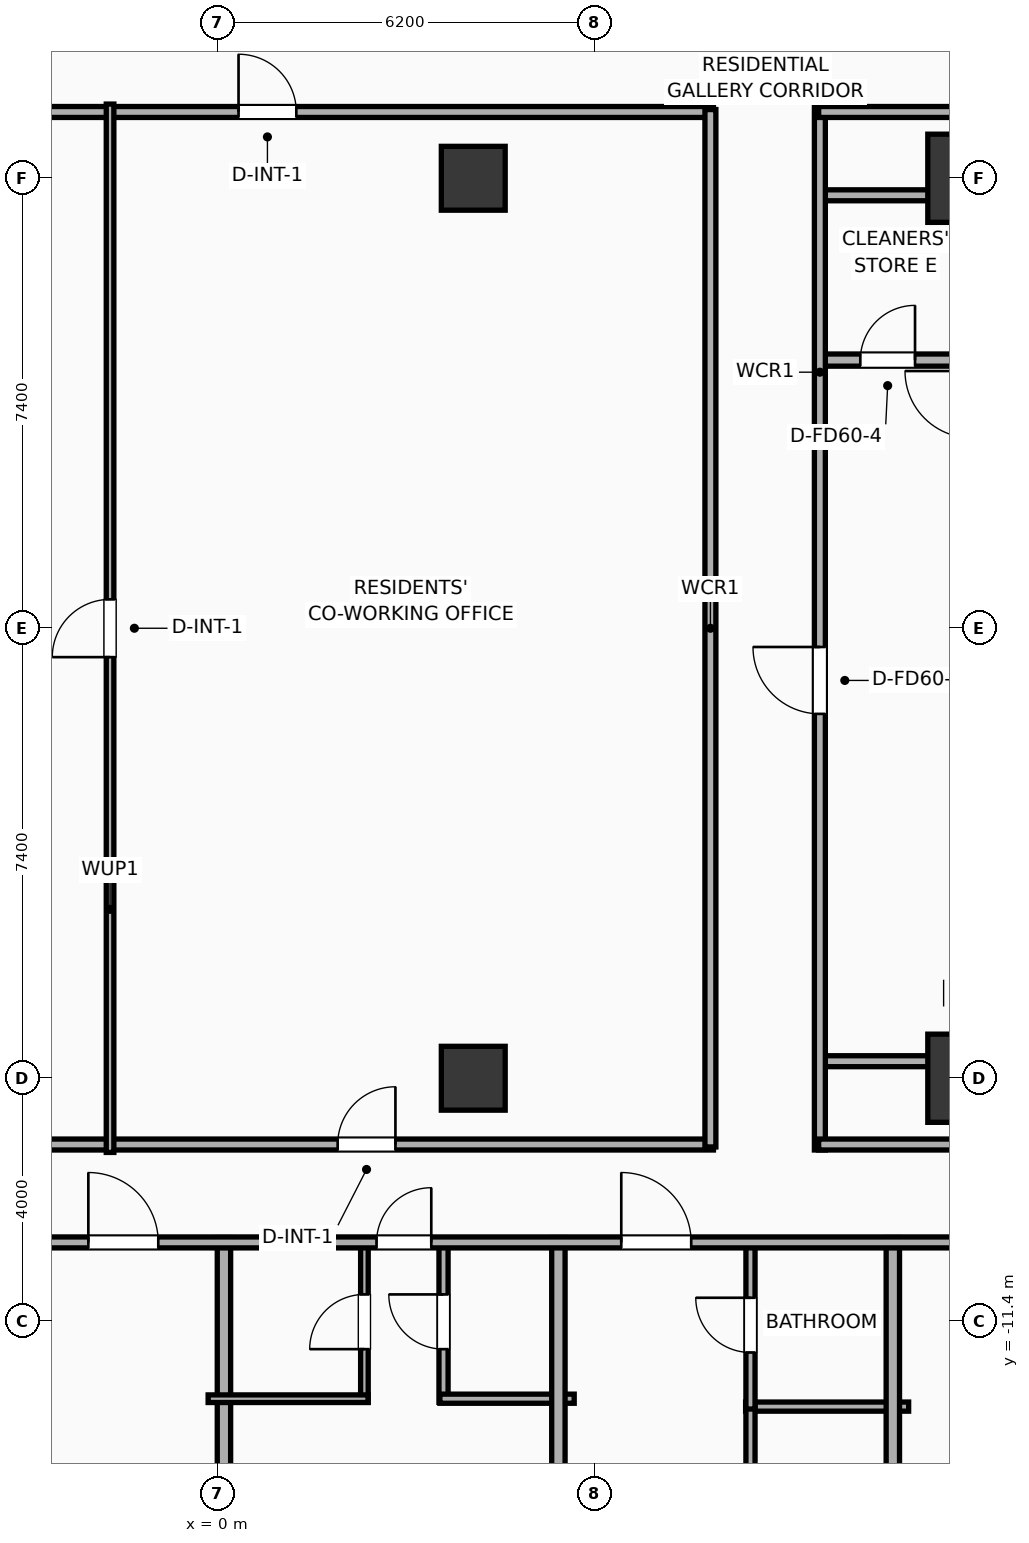
"""IFC4 building model, lengths in metres.
Left out: names, types, materials, properties, quantities, classifications, styles, units other than length and angle.
Written with IfcOpenShell. Run it as: python <this file> out.ifc"""

import sys

from ifc_helpers import new_model, si_unit, direction, frame, frame_2d, origin, origin_2d, place, context, subcontext, project, spatial, rectangle, extrude, element, fill, save


model = new_model("IFC4")
c1 = context("Model", 3, precision=1e-05, world=origin(), true_north=direction((0.0, 1.0)))
c2 = subcontext(c1, "Body", "Model", "MODEL_VIEW")
j1 = project(units=[si_unit("LENGTHUNIT", "METRE"), si_unit("PLANEANGLEUNIT", "RADIAN")], contexts=[c1])
p1 = place(None, origin())
s1 = spatial("IfcSite", under=j1, at=p1, CompositionType="ELEMENT")
p2 = place(p1, origin())
s2 = spatial("IfcBuilding", under=s1, at=p2, CompositionType="ELEMENT")
p3 = place(p2, frame((0.0, 0.0, 37.7)))
s3 = spatial("IfcBuildingStorey", under=s2, at=p3, CompositionType="ELEMENT", Elevation=37.7)
for number, where, z_axis, x_axis in (
    (1, (12.4, -7.4, 0.0), (0.0, 0.0, 1.0), (1.0, 0.0, 0.0)),
    (2, (12.4, 7.4, 0.0), (0.0, 0.0, 1.0), (1.0, 0.0, 0.0)),
):
    element("IfcColumn", number, at=place(p3, frame(where, z_axis=z_axis, x_axis=x_axis)), inside=s3, PredefinedType="COLUMN", context=c2, shape_type="SweptSolid", body=[
        extrude(rectangle(XDim=1.45, YDim=1.45, at=origin_2d()), origin(), (0.0, 0.0, 1.0), 3.9),
    ])
for number, where, z_axis, x_axis in (
    (3, (4.2, -7.4, 0.0), (0.0, 0.0, 1.0), (1.0, 0.0, 0.0)),
    (4, (4.2, 7.4, 0.0), (0.0, 0.0, 1.0), (1.0, 0.0, 0.0)),
):
    element("IfcColumn", number, at=place(p3, frame(where, z_axis=z_axis, x_axis=x_axis)), inside=s3, PredefinedType="COLUMN", context=c2, shape_type="SweptSolid", body=[
        extrude(rectangle(XDim=1.05, YDim=1.05, at=origin_2d()), origin(), (0.0, 0.0, 1.0), 3.9),
    ])
p4 = place(p3, frame((9.88, 4.41, 0.0), z_axis=(0.0, 0.0, 1.0), x_axis=(1.0, 0.0, 0.0)))
e5 = element("IfcWall", 5, at=p4, inside=s3, PredefinedType="PARTITIONING", context=c2, shape_type="SweptSolid", body=[
    extrude(rectangle(XDim=2.27, YDim=0.2, at=frame_2d((1.135, 0.0))), origin(), (0.0, 0.0, 1.0), 3.65),
])
p5 = place(p4, frame((0.685, 0.0, 0.0)))
e6 = element("IfcOpeningElement", 6, at=p5, cuts=e5, PredefinedType="OPENING", context=c2, shape_type="SweptSolid", body=[
    extrude(rectangle(XDim=0.9, YDim=2.05, at=frame_2d((0.45, 1.025))), frame((0.0, 0.11, 0.0), z_axis=(0.0, -1.0, 0.0), x_axis=(1.0, 0.0, 0.0)), (0.0, 0.0, 1.0), 0.22),
])
for number, where, z_axis, x_axis in (
    (7, (9.88, 7.12, 0.0), (0.0, 0.0, 1.0), (1.0, 0.0, 0.0)),
    (8, (9.88, -7.12, 0.0), (0.0, 0.0, 1.0), (1.0, 0.0, 0.0)),
):
    element("IfcWall", number, at=place(p3, frame(where, z_axis=z_axis, x_axis=x_axis)), inside=s3, PredefinedType="PARTITIONING", context=c2, shape_type="SweptSolid", body=[
        extrude(rectangle(XDim=2.27, YDim=0.18, at=frame_2d((1.135, 0.0))), origin(), (0.0, 0.0, 1.0), 2.94),
    ])
p6 = place(p3, frame((9.9, -8.58, 0.0), z_axis=(0.0, 0.0, 1.0), x_axis=(0.0, 1.0, 0.0)))
e9 = element("IfcWall", 9, at=p6, inside=s3, PredefinedType="PARTITIONING", context=c2, shape_type="SweptSolid", body=[
    extrude(rectangle(XDim=17.16, YDim=0.18, at=frame_2d((8.58, 0.0))), origin(), (0.0, 0.0, 1.0), 3.65),
])
p7 = place(p6, frame((7.172, 0.0, 0.0)))
e10 = element("IfcOpeningElement", 10, at=p7, cuts=e9, PredefinedType="OPENING", context=c2, shape_type="SweptSolid", body=[
    extrude(rectangle(XDim=1.1, YDim=2.05, at=frame_2d((0.55, 1.025))), frame((0.0, 0.1, 0.0), z_axis=(0.0, -1.0, 0.0), x_axis=(1.0, 0.0, 0.0)), (0.0, 0.0, 1.0), 0.2),
])
p8 = place(p3, frame((9.88, 8.49, 0.0), z_axis=(0.0, 0.0, 1.0), x_axis=(1.0, 0.0, 0.0)))
e11 = element("IfcWall", 11, at=p8, inside=s3, PredefinedType="PARTITIONING", context=c2, shape_type="SweptSolid", body=[
    extrude(rectangle(XDim=16.33, YDim=0.18, at=frame_2d((8.165, 0.0))), origin(), (0.0, 0.0, 1.0), 3.65),
])
p9 = place(p8, frame((13.99, 0.0, 0.0)))
e12 = element("IfcOpeningElement", 12, at=p9, cuts=e11, PredefinedType="OPENING", context=c2, shape_type="SweptSolid", body=[
    extrude(rectangle(XDim=0.9, YDim=2.05, at=frame_2d((0.45, 1.025))), frame((0.0, 0.1, 0.0), z_axis=(0.0, -1.0, 0.0), x_axis=(1.0, 0.0, 0.0)), (0.0, 0.0, 1.0), 0.2),
])
p10 = place(p3, frame((9.88, -8.49, 0.0), z_axis=(0.0, 0.0, 1.0), x_axis=(1.0, 0.0, 0.0)))
e13 = element("IfcWall", 13, at=p10, inside=s3, PredefinedType="PARTITIONING", context=c2, shape_type="SweptSolid", body=[
    extrude(rectangle(XDim=16.33, YDim=0.18, at=frame_2d((8.165, 0.0))), origin(), (0.0, 0.0, 1.0), 3.65),
])
p11 = place(p3, frame((-8.15, 8.49, 0.0), z_axis=(0.0, 0.0, 1.0), x_axis=(1.0, 0.0, 0.0)))
e14 = element("IfcWall", 14, at=p11, inside=s3, PredefinedType="PARTITIONING", context=c2, shape_type="SweptSolid", body=[
    extrude(rectangle(XDim=16.3, YDim=0.18, at=frame_2d((8.15, 0.0))), origin(), (0.0, 0.0, 1.0), 3.65),
])
p12 = place(p11, frame((8.49, 0.0, 0.0)))
e15 = element("IfcOpeningElement", 15, at=p12, cuts=e14, PredefinedType="OPENING", context=c2, shape_type="SweptSolid", body=[
    extrude(rectangle(XDim=0.95, YDim=2.05, at=frame_2d((0.475, 1.025))), frame((0.0, 0.1, 0.0), z_axis=(0.0, -1.0, 0.0), x_axis=(1.0, 0.0, 0.0)), (0.0, 0.0, 1.0), 0.2),
])
p13 = place(p3, frame((-8.15, -8.49, 0.0), z_axis=(0.0, 0.0, 1.0), x_axis=(1.0, 0.0, 0.0)))
e16 = element("IfcWall", 16, at=p13, inside=s3, PredefinedType="PARTITIONING", context=c2, shape_type="SweptSolid", body=[
    extrude(rectangle(XDim=16.3, YDim=0.18, at=frame_2d((8.15, 0.0))), origin(), (0.0, 0.0, 1.0), 3.65),
])
p14 = place(p13, frame((1.13, 0.0, 0.0)))
e17 = element("IfcOpeningElement", 17, at=p14, cuts=e16, PredefinedType="OPENING", context=c2, shape_type="SweptSolid", body=[
    extrude(rectangle(XDim=1.0, YDim=2.05, at=frame_2d((0.5, 1.025))), frame((0.0, 0.1, 0.0), z_axis=(0.0, -1.0, 0.0), x_axis=(1.0, 0.0, 0.0)), (0.0, 0.0, 1.0), 0.2),
])
p15 = place(p13, frame((10.12, 0.0, 0.0)))
e18 = element("IfcOpeningElement", 18, at=p15, cuts=e16, PredefinedType="OPENING", context=c2, shape_type="SweptSolid", body=[
    extrude(rectangle(XDim=0.95, YDim=2.05, at=frame_2d((0.475, 1.025))), frame((0.0, 0.1, 0.0), z_axis=(0.0, -1.0, 0.0), x_axis=(1.0, 0.0, 0.0)), (0.0, 0.0, 1.0), 0.2),
])
p16 = place(p3, frame((8.1, -8.53, 0.0), z_axis=(0.0, 0.0, 1.0), x_axis=(0.0, 1.0, 0.0)))
e19 = element("IfcWall", 19, at=p16, inside=s3, PredefinedType="PARTITIONING", context=c2, shape_type="SweptSolid", body=[
    extrude(rectangle(XDim=17.06, YDim=0.18, at=frame_2d((8.53, 0.0))), origin(), (0.0, 0.0, 1.0), 3.65),
])
p17 = place(p3, frame((-1.773, -8.62, 0.0), z_axis=(0.0, 0.0, 1.0), x_axis=(0.0, 1.0, 0.0)))
e20 = element("IfcWall", 20, at=p17, inside=s3, PredefinedType="PARTITIONING", context=c2, shape_type="SweptSolid", body=[
    extrude(rectangle(XDim=17.24, YDim=0.125, at=frame_2d((8.62, 0.0))), origin(), (0.0, 0.0, 1.0), 3.65),
])
p18 = place(p17, frame((8.145, 0.0, 0.0)))
e21 = element("IfcOpeningElement", 21, at=p18, cuts=e20, PredefinedType="OPENING", context=c2, shape_type="SweptSolid", body=[
    extrude(rectangle(XDim=0.95, YDim=2.05, at=frame_2d((0.475, 1.025))), frame((0.0, 0.073, 0.0), z_axis=(0.0, -1.0, 0.0), x_axis=(1.0, 0.0, 0.0)), (0.0, 0.0, 1.0), 0.145),
])
p19 = place(p3, frame((0.1, -22.21, 0.0), z_axis=(0.0, 0.0, 1.0), x_axis=(0.0, 1.0, 0.0)))
e22 = element("IfcWall", 22, at=p19, inside=s3, PredefinedType="PARTITIONING", context=c2, shape_type="SweptSolid", body=[
    extrude(rectangle(XDim=12.19, YDim=0.22, at=frame_2d((6.095, 0.0))), origin(), (0.0, 0.0, 1.0), 3.65),
])
p20 = place(p3, frame((2.41, -12.73, 0.0), z_axis=(0.0, 0.0, 1.0), x_axis=(0.0, 1.0, 0.0)))
e23 = element("IfcWall", 23, at=p20, inside=s3, PredefinedType="PARTITIONING", context=c2, shape_type="SweptSolid", body=[
    extrude(rectangle(XDim=2.65, YDim=0.125, at=frame_2d((1.325, 0.0))), origin(), (0.0, 0.0, 1.0), 3.65),
])
p21 = place(p20, frame((0.875, 0.0, 0.0)))
e24 = element("IfcOpeningElement", 24, at=p21, cuts=e23, PredefinedType="OPENING", context=c2, shape_type="SweptSolid", body=[
    extrude(rectangle(XDim=0.9, YDim=2.05, at=frame_2d((0.45, 1.025))), frame((0.0, 0.073, 0.0), z_axis=(0.0, -1.0, 0.0), x_axis=(1.0, 0.0, 0.0)), (0.0, 0.0, 1.0), 0.145),
])
p22 = place(p3, frame((3.711, -12.73, 0.0), z_axis=(0.0, 0.0, 1.0), x_axis=(0.0, 1.0, 0.0)))
e25 = element("IfcWall", 25, at=p22, inside=s3, PredefinedType="PLUMBINGWALL", context=c2, shape_type="SweptSolid", body=[
    extrude(rectangle(XDim=2.65, YDim=0.15, at=frame_2d((1.325, 0.0))), origin(), (0.0, 0.0, 1.0), 2.94),
])
p23 = place(p22, frame((0.875, 0.0, 0.0)))
e26 = element("IfcOpeningElement", 26, at=p23, cuts=e25, PredefinedType="OPENING", context=c2, shape_type="SweptSolid", body=[
    extrude(rectangle(XDim=0.9, YDim=2.05, at=frame_2d((0.45, 1.025))), frame((0.0, 0.085, 0.0), z_axis=(0.0, -1.0, 0.0), x_axis=(1.0, 0.0, 0.0)), (0.0, 0.0, 1.0), 0.17),
])
p24 = place(p3, frame((-0.16, -12.67, 0.0), z_axis=(0.0, 0.0, 1.0), x_axis=(1.0, 0.0, 0.0)))
e27 = element("IfcWall", 27, at=p24, inside=s3, PredefinedType="PARTITIONING", context=c2, shape_type="SweptSolid", body=[
    extrude(rectangle(XDim=2.63, YDim=0.125, at=frame_2d((1.315, 0.0))), origin(), (0.0, 0.0, 1.0), 3.65),
])
p25 = place(p3, frame((3.651, -12.67, 0.0), z_axis=(0.0, 0.0, 1.0), x_axis=(1.0, 0.0, 0.0)))
e28 = element("IfcWall", 28, at=p25, inside=s3, PredefinedType="PLUMBINGWALL", context=c2, shape_type="SweptSolid", body=[
    extrude(rectangle(XDim=2.209, YDim=0.15, at=frame_2d((1.104, 0.0))), origin(), (0.0, 0.0, 1.0), 3.65),
])
p26 = place(p3, frame((5.6, -22.21, 0.0), z_axis=(0.0, 0.0, 1.0), x_axis=(0.0, 1.0, 0.0)))
e29 = element("IfcWall", 29, at=p26, inside=s3, PredefinedType="PARTITIONING", context=c2, shape_type="SweptSolid", body=[
    extrude(rectangle(XDim=12.19, YDim=0.22, at=frame_2d((6.095, 0.0))), origin(), (0.0, 0.0, 1.0), 3.65),
])
p27 = place(p3, frame((8.679, -12.8, 0.0), z_axis=(0.0, 0.0, 1.0), x_axis=(1.0, 0.0, 0.0)))
e30 = element("IfcWall", 30, at=p27, inside=s3, PredefinedType="PLUMBINGWALL", context=c2, shape_type="SweptSolid", body=[
    extrude(rectangle(XDim=2.681, YDim=0.15, at=frame_2d((1.341, 0.0))), origin(), (0.0, 0.0, 1.0), 3.65),
])
p28 = place(p3, frame((8.759, -22.258, 0.0), z_axis=(0.0, 0.0, 1.0), x_axis=(0.0, 1.0, 0.0)))
e31 = element("IfcWall", 31, at=p28, inside=s3, PredefinedType="PLUMBINGWALL", context=c2, shape_type="SweptSolid", body=[
    extrude(rectangle(XDim=9.498, YDim=0.15, at=frame_2d((4.749, 0.0))), origin(), (0.0, 0.0, 1.0), 3.65),
])
p29 = place(p28, frame((7.338, 0.0, 0.0)))
e32 = element("IfcOpeningElement", 32, at=p29, cuts=e31, PredefinedType="OPENING", context=c2, shape_type="SweptSolid", body=[
    extrude(rectangle(XDim=0.9, YDim=2.05, at=frame_2d((0.45, 1.025))), frame((0.0, 0.085, 0.0), z_axis=(0.0, -1.0, 0.0), x_axis=(1.0, 0.0, 0.0)), (0.0, 0.0, 1.0), 0.17),
])
p30 = place(p3, frame((8.759, -12.84, 0.0), z_axis=(0.0, 0.0, 1.0), x_axis=(0.0, 1.0, 0.0)))
e33 = element("IfcWall", 33, at=p30, inside=s3, PredefinedType="PLUMBINGWALL", context=c2, shape_type="SweptSolid", body=[
    extrude(rectangle(XDim=2.76, YDim=0.15, at=frame_2d((1.38, 0.0))), origin(), (0.0, 0.0, 1.0), 3.65),
])
p31 = place(p30, frame((0.93, 0.0, 0.0)))
e34 = element("IfcOpeningElement", 34, at=p31, cuts=e33, PredefinedType="OPENING", context=c2, shape_type="SweptSolid", body=[
    extrude(rectangle(XDim=0.9, YDim=2.05, at=frame_2d((0.45, 1.025))), frame((0.0, 0.085, 0.0), z_axis=(0.0, -1.0, 0.0), x_axis=(1.0, 0.0, 0.0)), (0.0, 0.0, 1.0), 0.17),
])
p32 = place(p3, frame((11.1, -22.21, 0.0), z_axis=(0.0, 0.0, 1.0), x_axis=(0.0, 1.0, 0.0)))
e35 = element("IfcWall", 35, at=p32, inside=s3, PredefinedType="PARTITIONING", context=c2, shape_type="SweptSolid", body=[
    extrude(rectangle(XDim=12.19, YDim=0.22, at=frame_2d((6.095, 0.0))), origin(), (0.0, 0.0, 1.0), 3.65),
])
p33 = place(p3, frame((-33.41, -10.1, 0.0), z_axis=(0.0, 0.0, 1.0), x_axis=(1.0, 0.0, 0.0)))
e36 = element("IfcWall", 36, at=p33, inside=s3, PredefinedType="PARTITIONING", context=c2, shape_type="SweptSolid", body=[
    extrude(rectangle(XDim=59.62, YDim=0.18, at=frame_2d((29.81, 0.0))), origin(), (0.0, 0.0, 1.0), 3.65),
])
p34 = place(p33, frame((2.746, 0.0, 0.0)))
e37 = element("IfcOpeningElement", 37, at=p34, cuts=e36, PredefinedType="OPENING", context=c2, shape_type="SweptSolid", body=[
    extrude(rectangle(XDim=0.9, YDim=2.05, at=frame_2d((0.45, 1.025))), frame((0.0, 0.1, 0.0), z_axis=(0.0, -1.0, 0.0), x_axis=(1.0, 0.0, 0.0)), (0.0, 0.0, 1.0), 0.2),
])
p35 = place(p33, frame((11.552, 0.0, 0.0)))
e38 = element("IfcOpeningElement", 38, at=p35, cuts=e36, PredefinedType="OPENING", context=c2, shape_type="SweptSolid", body=[
    extrude(rectangle(XDim=1.15, YDim=2.05, at=frame_2d((0.575, 1.025))), frame((0.0, 0.1, 0.0), z_axis=(0.0, -1.0, 0.0), x_axis=(1.0, 0.0, 0.0)), (0.0, 0.0, 1.0), 0.2),
])
p36 = place(p33, frame((22.379, 0.0, 0.0)))
e39 = element("IfcOpeningElement", 39, at=p36, cuts=e36, PredefinedType="OPENING", context=c2, shape_type="SweptSolid", body=[
    extrude(rectangle(XDim=1.15, YDim=2.05, at=frame_2d((0.575, 1.025))), frame((0.0, 0.1, 0.0), z_axis=(0.0, -1.0, 0.0), x_axis=(1.0, 0.0, 0.0)), (0.0, 0.0, 1.0), 0.2),
])
p37 = place(p33, frame((31.28, 0.0, 0.0)))
e40 = element("IfcOpeningElement", 40, at=p37, cuts=e36, PredefinedType="OPENING", context=c2, shape_type="SweptSolid", body=[
    extrude(rectangle(XDim=1.15, YDim=2.05, at=frame_2d((0.575, 1.025))), frame((0.0, 0.1, 0.0), z_axis=(0.0, -1.0, 0.0), x_axis=(1.0, 0.0, 0.0)), (0.0, 0.0, 1.0), 0.2),
])
p38 = place(p33, frame((36.02, 0.0, 0.0)))
e41 = element("IfcOpeningElement", 41, at=p38, cuts=e36, PredefinedType="OPENING", context=c2, shape_type="SweptSolid", body=[
    extrude(rectangle(XDim=0.9, YDim=2.05, at=frame_2d((0.45, 1.025))), frame((0.0, 0.1, 0.0), z_axis=(0.0, -1.0, 0.0), x_axis=(1.0, 0.0, 0.0)), (0.0, 0.0, 1.0), 0.2),
])
p39 = place(p33, frame((40.044, 0.0, 0.0)))
e42 = element("IfcOpeningElement", 42, at=p39, cuts=e36, PredefinedType="OPENING", context=c2, shape_type="SweptSolid", body=[
    extrude(rectangle(XDim=1.15, YDim=2.05, at=frame_2d((0.575, 1.025))), frame((0.0, 0.1, 0.0), z_axis=(0.0, -1.0, 0.0), x_axis=(1.0, 0.0, 0.0)), (0.0, 0.0, 1.0), 0.2),
])
p40 = place(p33, frame((45.613, 0.0, 0.0)))
e43 = element("IfcOpeningElement", 43, at=p40, cuts=e36, PredefinedType="OPENING", context=c2, shape_type="SweptSolid", body=[
    extrude(rectangle(XDim=1.15, YDim=2.05, at=frame_2d((0.575, 1.025))), frame((0.0, 0.1, 0.0), z_axis=(0.0, -1.0, 0.0), x_axis=(1.0, 0.0, 0.0)), (0.0, 0.0, 1.0), 0.2),
])
p41 = place(p33, frame((54.174, 0.0, 0.0)))
e44 = element("IfcOpeningElement", 44, at=p41, cuts=e36, PredefinedType="OPENING", context=c2, shape_type="SweptSolid", body=[
    extrude(rectangle(XDim=1.15, YDim=2.05, at=frame_2d((0.575, 1.025))), frame((0.0, 0.1, 0.0), z_axis=(0.0, -1.0, 0.0), x_axis=(1.0, 0.0, 0.0)), (0.0, 0.0, 1.0), 0.2),
])
p42 = place(p5, origin())
e45 = element("IfcDoor", 45, at=p42, inside=s3, OperationType="SINGLE_SWING_RIGHT", PredefinedType="DOOR", context=c2, shape_type="SweptSolid", body=[
    extrude(rectangle(XDim=0.9, YDim=2.05, at=frame_2d((0.45, 1.025))), frame((0.0, 0.025, 0.0), z_axis=(0.0, -1.0, 0.0), x_axis=(1.0, 0.0, 0.0)), (0.0, 0.0, 1.0), 0.05),
])
fill(e6, e45)
p43 = place(p7, origin())
e46 = element("IfcDoor", 46, at=p43, inside=s3, OperationType="SINGLE_SWING_RIGHT", PredefinedType="DOOR", context=c2, shape_type="SweptSolid", body=[
    extrude(rectangle(XDim=1.1, YDim=2.05, at=frame_2d((0.55, 1.025))), frame((0.0, 0.025, 0.0), z_axis=(0.0, -1.0, 0.0), x_axis=(1.0, 0.0, 0.0)), (0.0, 0.0, 1.0), 0.05),
])
fill(e10, e46)
p44 = place(p12, origin())
e47 = element("IfcDoor", 47, at=p44, inside=s3, OperationType="SINGLE_SWING_LEFT", PredefinedType="DOOR", context=c2, shape_type="SweptSolid", body=[
    extrude(rectangle(XDim=0.95, YDim=2.05, at=frame_2d((0.475, 1.025))), frame((0.0, 0.025, 0.0), z_axis=(0.0, -1.0, 0.0), x_axis=(1.0, 0.0, 0.0)), (0.0, 0.0, 1.0), 0.05),
])
fill(e15, e47)
p45 = place(p15, origin())
e48 = element("IfcDoor", 48, at=p45, inside=s3, OperationType="SINGLE_SWING_RIGHT", PredefinedType="DOOR", context=c2, shape_type="SweptSolid", body=[
    extrude(rectangle(XDim=0.95, YDim=2.05, at=frame_2d((0.475, 1.025))), frame((0.0, 0.025, 0.0), z_axis=(0.0, -1.0, 0.0), x_axis=(1.0, 0.0, 0.0)), (0.0, 0.0, 1.0), 0.05),
])
fill(e18, e48)
p46 = place(p18, origin())
e49 = element("IfcDoor", 49, at=p46, inside=s3, OperationType="SINGLE_SWING_LEFT", PredefinedType="DOOR", context=c2, shape_type="SweptSolid", body=[
    extrude(rectangle(XDim=0.95, YDim=2.05, at=frame_2d((0.475, 1.025))), frame((0.0, 0.025, 0.0), z_axis=(0.0, -1.0, 0.0), x_axis=(1.0, 0.0, 0.0)), (0.0, 0.0, 1.0), 0.05),
])
fill(e21, e49)
p47 = place(p21, origin())
e50 = element("IfcDoor", 50, at=p47, inside=s3, OperationType="SINGLE_SWING_LEFT", PredefinedType="DOOR", context=c2, shape_type="SweptSolid", body=[
    extrude(rectangle(XDim=0.9, YDim=2.05, at=frame_2d((0.45, 1.025))), frame((0.0, 0.025, 0.0), z_axis=(0.0, -1.0, 0.0), x_axis=(1.0, 0.0, 0.0)), (0.0, 0.0, 1.0), 0.05),
])
fill(e24, e50)
p48 = place(p23, origin())
e51 = element("IfcDoor", 51, at=p48, inside=s3, OperationType="SINGLE_SWING_RIGHT", PredefinedType="DOOR", context=c2, shape_type="SweptSolid", body=[
    extrude(rectangle(XDim=0.9, YDim=2.05, at=frame_2d((0.45, 1.025))), frame((0.0, 0.025, 0.0), z_axis=(0.0, -1.0, 0.0), x_axis=(1.0, 0.0, 0.0)), (0.0, 0.0, 1.0), 0.05),
])
fill(e26, e51)
p49 = place(p31, origin())
e52 = element("IfcDoor", 52, at=p49, inside=s3, OperationType="SINGLE_SWING_RIGHT", PredefinedType="DOOR", context=c2, shape_type="SweptSolid", body=[
    extrude(rectangle(XDim=0.9, YDim=2.05, at=frame_2d((0.45, 1.025))), frame((0.0, 0.025, 0.0), z_axis=(0.0, -1.0, 0.0), x_axis=(1.0, 0.0, 0.0)), (0.0, 0.0, 1.0), 0.05),
])
fill(e34, e52)
p50 = place(p37, origin())
e53 = element("IfcDoor", 53, at=p50, inside=s3, OperationType="SINGLE_SWING_LEFT", PredefinedType="DOOR", context=c2, shape_type="SweptSolid", body=[
    extrude(rectangle(XDim=1.15, YDim=2.05, at=frame_2d((0.575, 1.025))), frame((0.0, 0.025, 0.0), z_axis=(0.0, -1.0, 0.0), x_axis=(1.0, 0.0, 0.0)), (0.0, 0.0, 1.0), 0.05),
])
fill(e40, e53)
p51 = place(p38, origin())
e54 = element("IfcDoor", 54, at=p51, inside=s3, OperationType="SINGLE_SWING_RIGHT", PredefinedType="DOOR", context=c2, shape_type="SweptSolid", body=[
    extrude(rectangle(XDim=0.9, YDim=2.05, at=frame_2d((0.45, 1.025))), frame((0.0, 0.025, 0.0), z_axis=(0.0, -1.0, 0.0), x_axis=(1.0, 0.0, 0.0)), (0.0, 0.0, 1.0), 0.05),
])
fill(e41, e54)
p52 = place(p39, origin())
e55 = element("IfcDoor", 55, at=p52, inside=s3, OperationType="SINGLE_SWING_LEFT", PredefinedType="DOOR", context=c2, shape_type="SweptSolid", body=[
    extrude(rectangle(XDim=1.15, YDim=2.05, at=frame_2d((0.575, 1.025))), frame((0.0, 0.025, 0.0), z_axis=(0.0, -1.0, 0.0), x_axis=(1.0, 0.0, 0.0)), (0.0, 0.0, 1.0), 0.05),
])
fill(e42, e55)
save(model, sys.argv[1])
